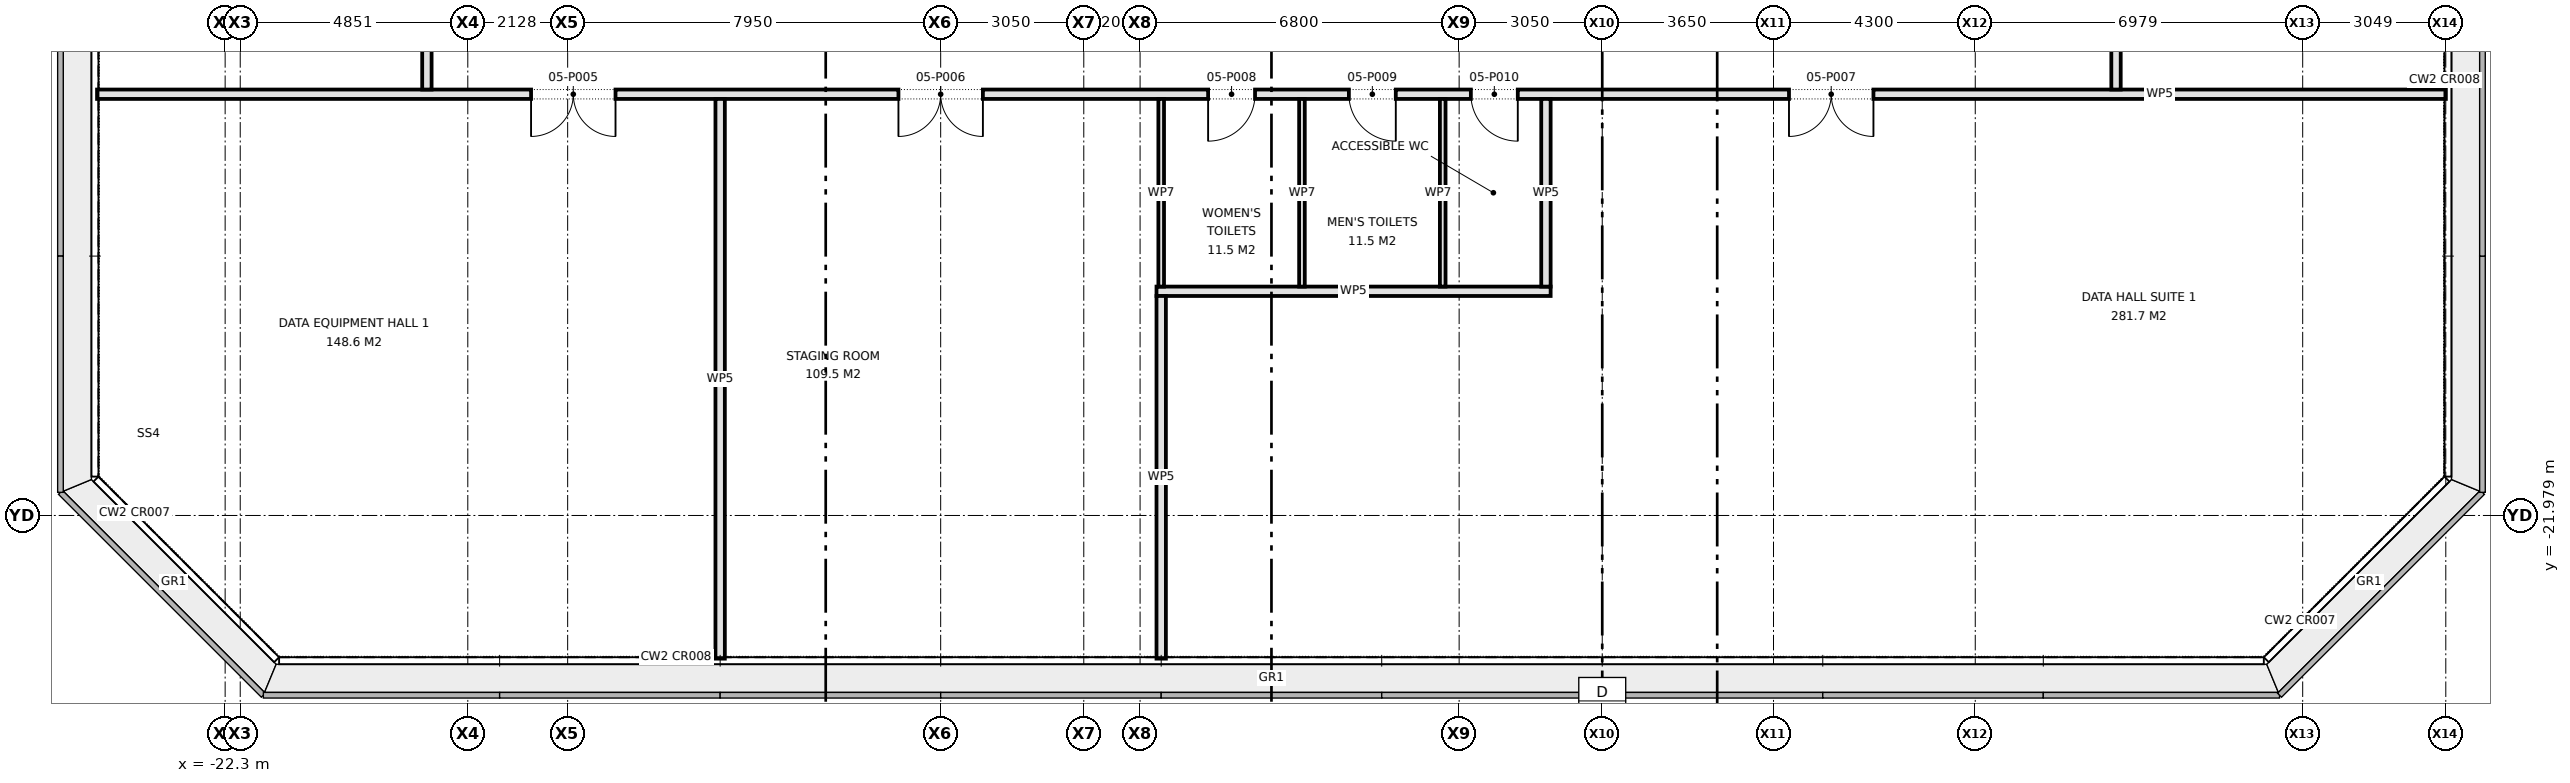
"""IFC4 building model, lengths in metres.
Left out: names, types, materials, properties, quantities, classifications, styles, units other than length and angle.
Written with IfcOpenShell. Run it as: python <this file> out.ifc"""

import sys

from ifc_helpers import new_model, si_unit, direction, frame, frame_2d, origin, place, context, subcontext, project, spatial, rectangle, extrude, element, fill, save


model = new_model("IFC4")
c1 = context("Model", 3, precision=1e-05, world=origin(), true_north=direction((0.0, 1.0)))
c2 = subcontext(c1, "Body", "Model", "MODEL_VIEW")
j1 = project(units=[si_unit("LENGTHUNIT", "METRE"), si_unit("PLANEANGLEUNIT", "RADIAN")], contexts=[c1])
p1 = place(None, origin())
s1 = spatial("IfcSite", under=j1, at=p1, CompositionType="ELEMENT")
p2 = place(p1, origin())
s2 = spatial("IfcBuilding", under=s1, at=p2, CompositionType="ELEMENT")
p3 = place(p2, frame((0.0, 0.0, 20.9)))
s3 = spatial("IfcBuildingStorey", under=s2, at=p3, CompositionType="ELEMENT", Elevation=20.9)
p4 = place(p3, frame((-2.45, -17.2, 0.0), z_axis=(0.0, 0.0, 1.0), x_axis=(1.0, 0.0, 0.0)))
e1 = element("IfcWall", 1, at=p4, inside=s3, PredefinedType="PARTITIONING", context=c2, shape_type="SweptSolid", body=[
    extrude(rectangle(XDim=8.4, YDim=0.2, at=frame_2d((4.2, 0.0))), origin(), (0.0, 0.0, 1.0), 4.575),
])
p5 = place(p3, frame((-25.03, -13.0, 0.0), z_axis=(0.0, 0.0, 1.0), x_axis=(1.0, 0.0, 0.0)))
e2 = element("IfcWall", 2, at=p5, inside=s3, PredefinedType="PARTITIONING", context=c2, shape_type="SweptSolid", body=[
    extrude(rectangle(XDim=50.06, YDim=0.2, at=frame_2d((25.03, 0.0))), origin(), (0.0, 0.0, 1.0), 4.575),
])
p6 = place(p5, frame((9.25, 0.0, 0.0)))
e3 = element("IfcOpeningElement", 3, at=p6, cuts=e2, PredefinedType="OPENING", context=c2, shape_type="SweptSolid", body=[
    extrude(rectangle(XDim=1.8, YDim=2.1, at=frame_2d((0.9, 1.05))), frame((0.0, 0.11, 0.0), z_axis=(0.0, -1.0, 0.0), x_axis=(1.0, 0.0, 0.0)), (0.0, 0.0, 1.0), 0.22),
])
p7 = place(p5, frame((17.08, 0.0, 0.0)))
e4 = element("IfcOpeningElement", 4, at=p7, cuts=e2, PredefinedType="OPENING", context=c2, shape_type="SweptSolid", body=[
    extrude(rectangle(XDim=1.8, YDim=2.1, at=frame_2d((0.9, 1.05))), frame((0.0, 0.11, 0.0), z_axis=(0.0, -1.0, 0.0), x_axis=(1.0, 0.0, 0.0)), (0.0, 0.0, 1.0), 0.22),
])
p8 = place(p5, frame((36.06, 0.0, 0.0)))
e5 = element("IfcOpeningElement", 5, at=p8, cuts=e2, PredefinedType="OPENING", context=c2, shape_type="SweptSolid", body=[
    extrude(rectangle(XDim=1.8, YDim=2.1, at=frame_2d((0.9, 1.05))), frame((0.0, 0.11, 0.0), z_axis=(0.0, -1.0, 0.0), x_axis=(1.0, 0.0, 0.0)), (0.0, 0.0, 1.0), 0.22),
])
p9 = place(p5, frame((23.68, 0.0, 0.0)))
e6 = element("IfcOpeningElement", 6, at=p9, cuts=e2, PredefinedType="OPENING", context=c2, shape_type="SweptSolid", body=[
    extrude(rectangle(XDim=1.0, YDim=2.1, at=frame_2d((0.5, 1.05))), frame((0.0, 0.11, 0.0), z_axis=(0.0, -1.0, 0.0), x_axis=(1.0, 0.0, 0.0)), (0.0, 0.0, 1.0), 0.22),
])
p10 = place(p5, frame((26.68, 0.0, 0.0)))
e7 = element("IfcOpeningElement", 7, at=p10, cuts=e2, PredefinedType="OPENING", context=c2, shape_type="SweptSolid", body=[
    extrude(rectangle(XDim=1.0, YDim=2.1, at=frame_2d((0.5, 1.05))), frame((0.0, 0.11, 0.0), z_axis=(0.0, -1.0, 0.0), x_axis=(1.0, 0.0, 0.0)), (0.0, 0.0, 1.0), 0.22),
])
p11 = place(p5, frame((29.28, 0.0, 0.0)))
e8 = element("IfcOpeningElement", 8, at=p11, cuts=e2, PredefinedType="OPENING", context=c2, shape_type="SweptSolid", body=[
    extrude(rectangle(XDim=1.0, YDim=2.1, at=frame_2d((0.5, 1.05))), frame((0.0, 0.11, 0.0), z_axis=(0.0, -1.0, 0.0), x_axis=(1.0, 0.0, 0.0)), (0.0, 0.0, 1.0), 0.22),
])
p12 = place(p3, frame((18.0, -12.9, 0.0), z_axis=(0.0, 0.0, 1.0), x_axis=(0.0, 1.0, 0.0)))
e9 = element("IfcWall", 9, at=p12, inside=s3, PredefinedType="PARTITIONING", context=c2, shape_type="SweptSolid", body=[
    extrude(rectangle(XDim=25.8, YDim=0.2, at=frame_2d((12.9, 0.0))), origin(), (0.0, 0.0, 1.0), 4.575),
])
p13 = place(p12, frame((4.725, 0.0, 0.0)))
e10 = element("IfcOpeningElement", 10, at=p13, cuts=e9, PredefinedType="OPENING", context=c2, shape_type="SweptSolid", body=[
    extrude(rectangle(XDim=1.0, YDim=2.1, at=frame_2d((0.5, 1.05))), frame((0.0, 0.11, 0.0), z_axis=(0.0, -1.0, 0.0), x_axis=(1.0, 0.0, 0.0)), (0.0, 0.0, 1.0), 0.22),
])
p14 = place(p12, frame((14.65, 0.0, 0.0)))
e11 = element("IfcOpeningElement", 11, at=p14, cuts=e9, PredefinedType="OPENING", context=c2, shape_type="SweptSolid", body=[
    extrude(rectangle(XDim=1.2, YDim=2.1, at=frame_2d((0.6, 1.05))), frame((0.0, 0.11, 0.0), z_axis=(0.0, -1.0, 0.0), x_axis=(1.0, 0.0, 0.0)), (0.0, 0.0, 1.0), 0.22),
])
p15 = place(p12, frame((22.025, 0.0, 0.0)))
e12 = element("IfcOpeningElement", 12, at=p15, cuts=e9, PredefinedType="OPENING", context=c2, shape_type="SweptSolid", body=[
    extrude(rectangle(XDim=1.8, YDim=2.1, at=frame_2d((0.9, 1.05))), frame((0.0, 0.11, 0.0), z_axis=(0.0, -1.0, 0.0), x_axis=(1.0, 0.0, 0.0)), (0.0, 0.0, 1.0), 0.22),
])
p16 = place(p3, frame((5.85, -17.1, 0.0), z_axis=(0.0, 0.0, 1.0), x_axis=(0.0, 1.0, 0.0)))
e13 = element("IfcWall", 13, at=p16, inside=s3, PredefinedType="PARTITIONING", context=c2, shape_type="SweptSolid", body=[
    extrude(rectangle(XDim=4.0, YDim=0.2, at=frame_2d((2.0, 0.0))), origin(), (0.0, 0.0, 1.0), 4.575),
])
p17 = place(p3, frame((-2.35, -25.03, 0.0), z_axis=(0.0, 0.0, 1.0), x_axis=(0.0, 1.0, 0.0)))
e14 = element("IfcWall", 14, at=p17, inside=s3, PredefinedType="PARTITIONING", context=c2, shape_type="SweptSolid", body=[
    extrude(rectangle(XDim=7.73, YDim=0.2, at=frame_2d((3.865, 0.0))), origin(), (0.0, 0.0, 1.0), 4.575),
])
p18 = place(p3, frame((-11.75, -25.03, 0.0), z_axis=(0.0, 0.0, 1.0), x_axis=(0.0, 1.0, 0.0)))
e15 = element("IfcWall", 15, at=p18, inside=s3, PredefinedType="PARTITIONING", context=c2, shape_type="SweptSolid", body=[
    extrude(rectangle(XDim=11.93, YDim=0.2, at=frame_2d((5.965, 0.0))), origin(), (0.0, 0.0, 1.0), 4.575),
])
p19 = place(p3, frame((-18.0, -12.9, 0.0), z_axis=(0.0, 0.0, 1.0), x_axis=(0.0, 1.0, 0.0)))
e16 = element("IfcWall", 16, at=p19, inside=s3, PredefinedType="PARTITIONING", context=c2, shape_type="SweptSolid", body=[
    extrude(rectangle(XDim=30.3, YDim=0.2, at=frame_2d((15.15, 0.0))), origin(), (0.0, 0.0, 1.0), 4.575),
])
p20 = place(p19, frame((6.675, 0.0, 0.0)))
e17 = element("IfcOpeningElement", 17, at=p20, cuts=e16, PredefinedType="OPENING", context=c2, shape_type="SweptSolid", body=[
    extrude(rectangle(XDim=1.8, YDim=2.1, at=frame_2d((0.9, 1.05))), frame((0.0, 0.11, 0.0), z_axis=(0.0, -1.0, 0.0), x_axis=(1.0, 0.0, 0.0)), (0.0, 0.0, 1.0), 0.22),
])
p21 = place(p19, frame((19.675, 0.0, 0.0)))
e18 = element("IfcOpeningElement", 18, at=p21, cuts=e16, PredefinedType="OPENING", context=c2, shape_type="SweptSolid", body=[
    extrude(rectangle(XDim=1.8, YDim=2.1, at=frame_2d((0.9, 1.05))), frame((0.0, 0.11, 0.0), z_axis=(0.0, -1.0, 0.0), x_axis=(1.0, 0.0, 0.0)), (0.0, 0.0, 1.0), 0.22),
])
for number, where, z_axis, x_axis in (
    (19, (3.65, -17.1, 0.0), (0.0, 0.0, 1.0), (0.0, 1.0, 0.0)),
    (20, (0.65, -17.1, 0.0), (0.0, 0.0, 1.0), (0.0, 1.0, 0.0)),
    (21, (-2.35, -17.1, 0.0), (0.0, 0.0, 1.0), (0.0, 1.0, 0.0)),
):
    element("IfcWall", number, at=place(p3, frame(where, z_axis=z_axis, x_axis=x_axis)), inside=s3, PredefinedType="PARTITIONING", context=c2, shape_type="SweptSolid", body=[
        extrude(rectangle(XDim=4.0, YDim=0.12, at=frame_2d((2.0, 0.0))), origin(), (0.0, 0.0, 1.0), 4.575),
    ])
p22 = place(p6, frame((1.8, 0.0, 0.0), z_axis=(0.0, 0.0, 1.0), x_axis=(-1.0, 0.0, 0.0)))
e22 = element("IfcDoor", 22, at=p22, inside=s3, OperationType="DOUBLE_DOOR_SINGLE_SWING", PredefinedType="DOOR", context=c2, shape_type="SweptSolid", body=[
    extrude(rectangle(XDim=1.8, YDim=2.1, at=frame_2d((0.9, 1.05))), frame((0.0, 0.025, 0.0), z_axis=(0.0, -1.0, 0.0), x_axis=(1.0, 0.0, 0.0)), (0.0, 0.0, 1.0), 0.05),
])
fill(e3, e22)
p23 = place(p7, frame((1.8, 0.0, 0.0), z_axis=(0.0, 0.0, 1.0), x_axis=(-1.0, 0.0, 0.0)))
e23 = element("IfcDoor", 23, at=p23, inside=s3, OperationType="DOUBLE_DOOR_SINGLE_SWING", PredefinedType="DOOR", context=c2, shape_type="SweptSolid", body=[
    extrude(rectangle(XDim=1.8, YDim=2.1, at=frame_2d((0.9, 1.05))), frame((0.0, 0.025, 0.0), z_axis=(0.0, -1.0, 0.0), x_axis=(1.0, 0.0, 0.0)), (0.0, 0.0, 1.0), 0.05),
])
fill(e4, e23)
p24 = place(p8, frame((1.8, 0.0, 0.0), z_axis=(0.0, 0.0, 1.0), x_axis=(-1.0, 0.0, 0.0)))
e24 = element("IfcDoor", 24, at=p24, inside=s3, OperationType="DOUBLE_DOOR_SINGLE_SWING", PredefinedType="DOOR", context=c2, shape_type="SweptSolid", body=[
    extrude(rectangle(XDim=1.8, YDim=2.1, at=frame_2d((0.9, 1.05))), frame((0.0, 0.025, 0.0), z_axis=(0.0, -1.0, 0.0), x_axis=(1.0, 0.0, 0.0)), (0.0, 0.0, 1.0), 0.05),
])
fill(e5, e24)
p25 = place(p9, frame((1.0, 0.0, 0.0), z_axis=(0.0, 0.0, 1.0), x_axis=(-1.0, 0.0, 0.0)))
e25 = element("IfcDoor", 25, at=p25, inside=s3, OperationType="SINGLE_SWING_RIGHT", PredefinedType="DOOR", context=c2, shape_type="SweptSolid", body=[
    extrude(rectangle(XDim=1.0, YDim=2.1, at=frame_2d((0.5, 1.05))), frame((0.0, 0.025, 0.0), z_axis=(0.0, -1.0, 0.0), x_axis=(1.0, 0.0, 0.0)), (0.0, 0.0, 1.0), 0.05),
])
fill(e6, e25)
p26 = place(p10, frame((1.0, 0.0, 0.0), z_axis=(0.0, 0.0, 1.0), x_axis=(-1.0, 0.0, 0.0)))
e26 = element("IfcDoor", 26, at=p26, inside=s3, OperationType="SINGLE_SWING_LEFT", PredefinedType="DOOR", context=c2, shape_type="SweptSolid", body=[
    extrude(rectangle(XDim=1.0, YDim=2.1, at=frame_2d((0.5, 1.05))), frame((0.0, 0.025, 0.0), z_axis=(0.0, -1.0, 0.0), x_axis=(1.0, 0.0, 0.0)), (0.0, 0.0, 1.0), 0.05),
])
fill(e7, e26)
p27 = place(p11, frame((1.0, 0.0, 0.0), z_axis=(0.0, 0.0, 1.0), x_axis=(-1.0, 0.0, 0.0)))
e27 = element("IfcDoor", 27, at=p27, inside=s3, OperationType="SINGLE_SWING_LEFT", PredefinedType="DOOR", context=c2, shape_type="SweptSolid", body=[
    extrude(rectangle(XDim=1.0, YDim=2.1, at=frame_2d((0.5, 1.05))), frame((0.0, 0.025, 0.0), z_axis=(0.0, -1.0, 0.0), x_axis=(1.0, 0.0, 0.0)), (0.0, 0.0, 1.0), 0.05),
])
fill(e8, e27)
save(model, sys.argv[1])
